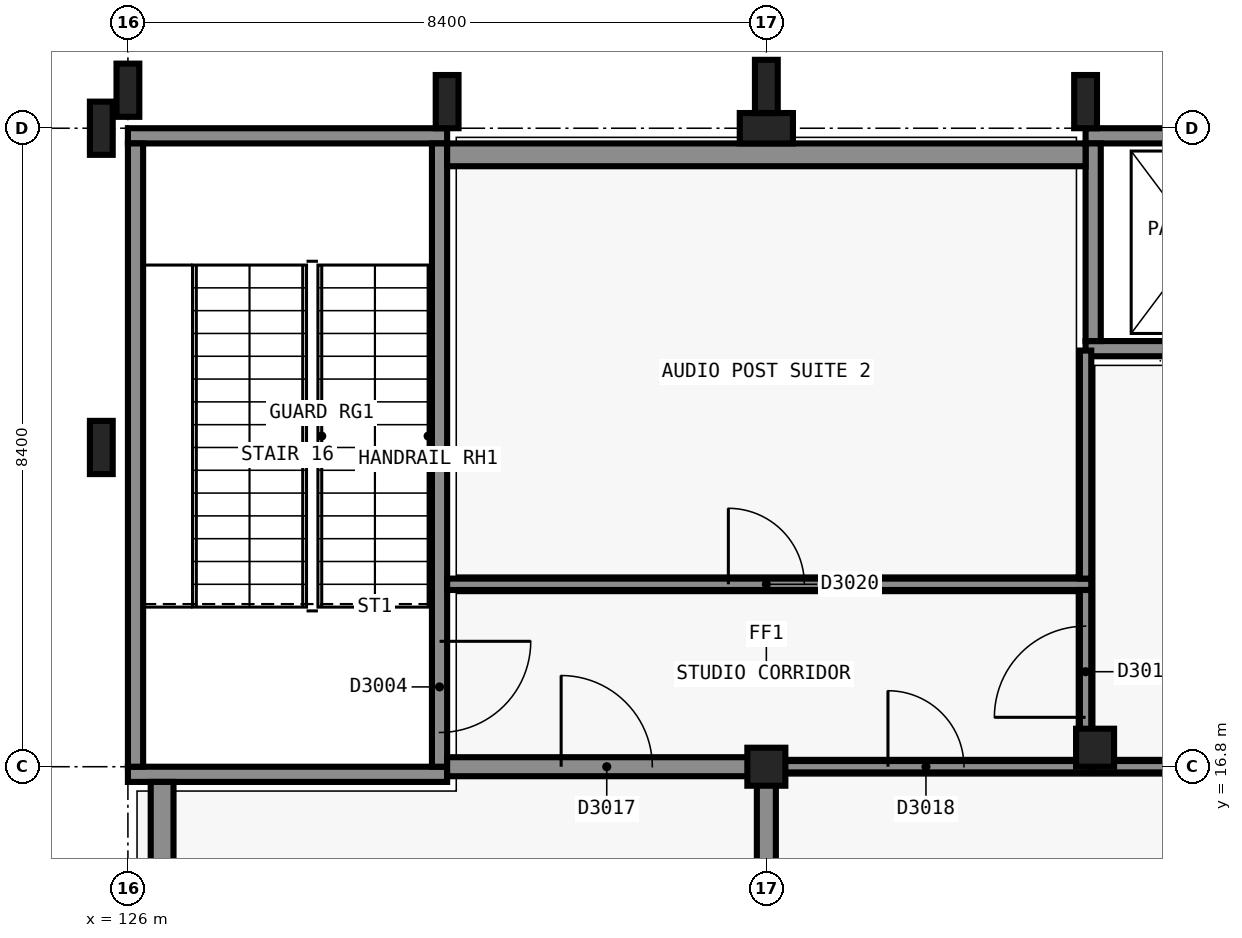
"""IFC4 building model, lengths in metres.
Left out: names, types, materials, properties, quantities, classifications, styles, units other than length and angle.
Written with IfcOpenShell. Run it as: python <this file> out.ifc"""

import sys

from ifc_helpers import new_model, si_unit, direction, frame, frame_2d, origin, origin_2d, place, context, subcontext, project, spatial, rectangle, extrude, element, fill, save


model = new_model("IFC4")
c1 = context("Model", 3, precision=1e-05, world=origin(), true_north=direction((0.0, 1.0)))
c2 = subcontext(c1, "Body", "Model", "MODEL_VIEW")
j1 = project(units=[si_unit("LENGTHUNIT", "METRE"), si_unit("PLANEANGLEUNIT", "RADIAN")], contexts=[c1])
p1 = place(None, origin())
s1 = spatial("IfcSite", under=j1, at=p1, CompositionType="ELEMENT")
p2 = place(p1, origin())
s2 = spatial("IfcBuilding", under=s1, at=p2, CompositionType="ELEMENT")
p3 = place(p2, frame((0.0, 0.0, 15.0)))
s3 = spatial("IfcBuildingStorey", under=s2, at=p3, CompositionType="ELEMENT", Elevation=15.0)
for number, where, z_axis, x_axis in (
    (1, (130.2, 16.7, 0.0), (0.0, 0.0, 1.0), (-1.0, 0.0, 0.0)),
    (2, (126.0, 25.1, 0.0), (0.0, 0.0, 1.0), (1.0, 0.0, 0.0)),
):
    element("IfcWall", number, at=place(p3, frame(where, z_axis=z_axis, x_axis=x_axis)), inside=s3, PredefinedType="SHEAR", context=c2, shape_type="SweptSolid", body=[
        extrude(rectangle(XDim=4.2, YDim=0.2, at=frame_2d((2.1, 0.0))), origin(), (0.0, 0.0, 1.0), 4.8),
    ])
p4 = place(p3, frame((126.1, 16.8, 0.0), z_axis=(0.0, 0.0, 1.0), x_axis=(0.0, 1.0, 0.0)))
e3 = element("IfcWall", 3, at=p4, inside=s3, PredefinedType="SHEAR", context=c2, shape_type="SweptSolid", body=[
    extrude(rectangle(XDim=8.2, YDim=0.2, at=frame_2d((4.1, 0.0))), origin(), (0.0, 0.0, 1.0), 4.8),
])
p5 = place(p3, frame((130.1, 25.0, 0.0), z_axis=(0.0, 0.0, 1.0), x_axis=(0.0, -1.0, 0.0)))
e4 = element("IfcWall", 4, at=p5, inside=s3, PredefinedType="SHEAR", context=c2, shape_type="SweptSolid", body=[
    extrude(rectangle(XDim=8.2, YDim=0.2, at=frame_2d((4.1, 0.0))), origin(), (0.0, 0.0, 1.0), 4.8),
])
p6 = place(p5, frame((6.55, 0.0, 0.0)))
e5 = element("IfcOpeningElement", 5, at=p6, cuts=e4, PredefinedType="OPENING", context=c2, shape_type="SweptSolid", body=[
    extrude(rectangle(XDim=1.2, YDim=2.1, at=frame_2d((0.6, 1.05))), frame((0.0, 0.11, 0.0), z_axis=(0.0, -1.0, 0.0), x_axis=(1.0, 0.0, 0.0)), (0.0, 0.0, 1.0), 0.22),
])
p7 = place(p3, frame((141.6, 22.3, 0.0), z_axis=(0.0, 0.0, 1.0), x_axis=(-1.0, 0.0, 0.0)))
e6 = element("IfcWall", 6, at=p7, inside=s3, PredefinedType="SHEAR", context=c2, shape_type="SweptSolid", body=[
    extrude(rectangle(XDim=3.0, YDim=0.2, at=frame_2d((1.5, 0.0))), origin(), (0.0, 0.0, 1.0), 4.8),
])
p8 = place(p7, frame((0.95, 0.0, 0.0)))
e7 = element("IfcOpeningElement", 7, at=p8, cuts=e6, PredefinedType="OPENING", context=c2, shape_type="SweptSolid", body=[
    extrude(rectangle(XDim=1.1, YDim=2.1, at=frame_2d((0.55, 1.05))), frame((0.0, 0.11, 0.0), z_axis=(0.0, -1.0, 0.0), x_axis=(1.0, 0.0, 0.0)), (0.0, 0.0, 1.0), 0.22),
])
p9 = place(p3, frame((138.6, 25.1, 0.0), z_axis=(0.0, 0.0, 1.0), x_axis=(1.0, 0.0, 0.0)))
e8 = element("IfcWall", 8, at=p9, inside=s3, PredefinedType="SHEAR", context=c2, shape_type="SweptSolid", body=[
    extrude(rectangle(XDim=3.0, YDim=0.2, at=frame_2d((1.5, 0.0))), origin(), (0.0, 0.0, 1.0), 4.8),
])
p10 = place(p3, frame((138.7, 22.4, 0.0), z_axis=(0.0, 0.0, 1.0), x_axis=(0.0, 1.0, 0.0)))
e9 = element("IfcWall", 9, at=p10, inside=s3, PredefinedType="SHEAR", context=c2, shape_type="SweptSolid", body=[
    extrude(rectangle(XDim=2.6, YDim=0.2, at=frame_2d((1.3, 0.0))), origin(), (0.0, 0.0, 1.0), 4.8),
])
p11 = place(p3, frame((134.4, 16.8, 0.0), z_axis=(0.0, 0.0, 1.0), x_axis=(1.0, 0.0, 0.0)))
e10 = element("IfcColumn", 10, at=p11, inside=s3, PredefinedType="COLUMN", context=c2, shape_type="SweptSolid", body=[
    extrude(rectangle(XDim=0.5, YDim=0.5, at=origin_2d()), origin(), (0.0, 0.0, 1.0), 4.8),
])
p12 = place(p3, frame((134.4, 25.2, 0.0), z_axis=(0.0, 0.0, 1.0), x_axis=(1.0, 0.0, 0.0)))
e11 = element("IfcColumn", 11, at=p12, inside=s3, PredefinedType="COLUMN", context=c2, shape_type="SweptSolid", body=[
    extrude(rectangle(XDim=0.7, YDim=0.4, at=origin_2d()), origin(), (0.0, 0.0, 1.0), 4.8),
])
p13 = place(p3, frame((138.725, 17.05, 0.0), z_axis=(0.0, 0.0, 1.0), x_axis=(1.0, 0.0, 0.0)))
e12 = element("IfcColumn", 12, at=p13, inside=s3, PredefinedType="COLUMN", context=c2, shape_type="SweptSolid", body=[
    extrude(rectangle(XDim=0.5, YDim=0.5, at=origin_2d()), origin(), (0.0, 0.0, 1.0), 4.8),
])
p14 = place(p3, frame((130.2, 24.85, 0.0), z_axis=(0.0, 0.0, 1.0), x_axis=(1.0, 0.0, 0.0)))
e13 = element("IfcWall", 13, at=p14, inside=s3, PredefinedType="SOLIDWALL", context=c2, shape_type="SweptSolid", body=[
    extrude(rectangle(XDim=8.4, YDim=0.3, at=frame_2d((4.2, 0.0))), origin(), (0.0, 0.0, 1.0), 4.5),
])
for number, where, z_axis, x_axis in (
    (14, (126.0, 25.7, 0.0), (0.0, 0.0, 1.0), (1.0, 0.0, 0.0)),
    (15, (130.2, 25.55, 0.0), (0.0, 0.0, 1.0), (1.0, 0.0, 0.0)),
    (16, (134.4, 25.75, 0.0), (0.0, 0.0, 1.0), (1.0, 0.0, 0.0)),
    (17, (138.6, 25.55, 0.0), (0.0, 0.0, 1.0), (1.0, 0.0, 0.0)),
):
    element("IfcColumn", number, at=place(p3, frame(where, z_axis=z_axis, x_axis=x_axis)), inside=s3, PredefinedType="PILASTER", context=c2, shape_type="SweptSolid", body=[
        extrude(rectangle(XDim=0.3, YDim=0.7, at=origin_2d()), origin(), (0.0, 0.0, 1.0), 4.8),
    ])
p15 = place(p3, frame((126.45, 12.8, 0.0), z_axis=(0.0, 0.0, 1.0), x_axis=(0.0, 1.0, 0.0)))
e18 = element("IfcWall", 18, at=p15, inside=s3, PredefinedType="SOLIDWALL", context=c2, shape_type="SweptSolid", body=[
    extrude(rectangle(XDim=3.8, YDim=0.3, at=frame_2d((1.9, 0.0))), origin(), (0.0, 0.0, 1.0), 4.5),
])
for number, where, z_axis, x_axis in (
    (19, (125.65, 21.0, 0.0), (0.0, 0.0, 1.0), (0.0, 1.0, 0.0)),
    (20, (125.65, 25.2, 0.0), (0.0, 0.0, 1.0), (0.0, 1.0, 0.0)),
):
    element("IfcColumn", number, at=place(p3, frame(where, z_axis=z_axis, x_axis=x_axis)), inside=s3, PredefinedType="PILASTER", context=c2, shape_type="SweptSolid", body=[
        extrude(rectangle(XDim=0.3, YDim=0.7, at=origin_2d()), origin(), (0.0, 0.0, 1.0), 4.8),
    ])
p16 = place(p3, frame((130.2, 16.8, 0.0), z_axis=(0.0, 0.0, 1.0), x_axis=(1.0, 0.0, 0.0)))
e21 = element("IfcWall", 21, at=p16, inside=s3, PredefinedType="PARTITIONING", context=c2, shape_type="SweptSolid", body=[
    extrude(rectangle(XDim=4.325, YDim=0.25, at=frame_2d((2.163, 0.0))), origin(), (0.0, 0.0, 1.0), 3.7),
])
p17 = place(p16, frame((1.5, 0.0, 0.0)))
e22 = element("IfcOpeningElement", 22, at=p17, cuts=e21, PredefinedType="OPENING", context=c2, shape_type="SweptSolid", body=[
    extrude(rectangle(XDim=1.2, YDim=2.1, at=frame_2d((0.6, 1.05))), frame((0.0, 0.135, 0.0), z_axis=(0.0, -1.0, 0.0), x_axis=(1.0, 0.0, 0.0)), (0.0, 0.0, 1.0), 0.27),
])
p18 = place(p3, frame((134.4, 12.8, 0.0), z_axis=(0.0, 0.0, 1.0), x_axis=(0.0, 1.0, 0.0)))
e23 = element("IfcWall", 23, at=p18, inside=s3, PredefinedType="PARTITIONING", context=c2, shape_type="SweptSolid", body=[
    extrude(rectangle(XDim=3.875, YDim=0.25, at=frame_2d((1.938, 0.0))), origin(), (0.0, 0.0, 1.0), 3.7),
])
p19 = place(p3, frame((134.525, 16.8, 0.0), z_axis=(0.0, 0.0, 1.0), x_axis=(1.0, 0.0, 0.0)))
e24 = element("IfcWall", 24, at=p19, inside=s3, PredefinedType="PARTITIONING", context=c2, shape_type="SweptSolid", body=[
    extrude(rectangle(XDim=4.15, YDim=0.15, at=frame_2d((2.075, 0.0))), origin(), (0.0, 0.0, 1.0), 3.7),
])
p20 = place(p19, frame((1.475, 0.0, 0.0)))
e25 = element("IfcOpeningElement", 25, at=p20, cuts=e24, PredefinedType="OPENING", context=c2, shape_type="SweptSolid", body=[
    extrude(rectangle(XDim=1.0, YDim=2.1, at=frame_2d((0.5, 1.05))), frame((0.0, 0.085, 0.0), z_axis=(0.0, -1.0, 0.0), x_axis=(1.0, 0.0, 0.0)), (0.0, 0.0, 1.0), 0.17),
])
p21 = place(p3, frame((130.2, 19.2, 0.0), z_axis=(0.0, 0.0, 1.0), x_axis=(1.0, 0.0, 0.0)))
e26 = element("IfcWall", 26, at=p21, inside=s3, PredefinedType="PARTITIONING", context=c2, shape_type="SweptSolid", body=[
    extrude(rectangle(XDim=8.475, YDim=0.15, at=frame_2d((4.237, 0.0))), origin(), (0.0, 0.0, 1.0), 3.7),
])
p22 = place(p21, frame((3.7, 0.0, 0.0)))
e27 = element("IfcOpeningElement", 27, at=p22, cuts=e26, PredefinedType="OPENING", context=c2, shape_type="SweptSolid", body=[
    extrude(rectangle(XDim=1.0, YDim=2.1, at=frame_2d((0.5, 1.05))), frame((0.0, 0.085, 0.0), z_axis=(0.0, -1.0, 0.0), x_axis=(1.0, 0.0, 0.0)), (0.0, 0.0, 1.0), 0.17),
])
p23 = place(p3, frame((138.675, 16.8, 0.0), z_axis=(0.0, 0.0, 1.0), x_axis=(1.0, 0.0, 0.0)))
e28 = element("IfcWall", 28, at=p23, inside=s3, PredefinedType="SOLIDWALL", context=c2, shape_type="SweptSolid", body=[
    extrude(rectangle(XDim=7.05, YDim=0.15, at=frame_2d((3.525, 0.0))), origin(), (0.0, 0.0, 1.0), 3.7),
])
p24 = place(p3, frame((138.6, 16.875, 0.0), z_axis=(0.0, 0.0, 1.0), x_axis=(0.0, 1.0, 0.0)))
e29 = element("IfcWall", 29, at=p24, inside=s3, PredefinedType="SOLIDWALL", context=c2, shape_type="SweptSolid", body=[
    extrude(rectangle(XDim=2.25, YDim=0.15, at=frame_2d((1.125, 0.0))), origin(), (0.0, 0.0, 1.0), 3.7),
])
p25 = place(p24, frame((0.575, 0.0, 0.0)))
e30 = element("IfcOpeningElement", 30, at=p25, cuts=e29, PredefinedType="OPENING", context=c2, shape_type="SweptSolid", body=[
    extrude(rectangle(XDim=1.2, YDim=2.1, at=frame_2d((0.6, 1.05))), frame((0.0, 0.085, 0.0), z_axis=(0.0, -1.0, 0.0), x_axis=(1.0, 0.0, 0.0)), (0.0, 0.0, 1.0), 0.17),
])
p26 = place(p3, frame((138.6, 19.275, 0.0), z_axis=(0.0, 0.0, 1.0), x_axis=(0.0, 1.0, 0.0)))
e31 = element("IfcWall", 31, at=p26, inside=s3, PredefinedType="SOLIDWALL", context=c2, shape_type="SweptSolid", body=[
    extrude(rectangle(XDim=3.0, YDim=0.15, at=frame_2d((1.5, 0.0))), origin(), (0.0, 0.0, 1.0), 3.9),
])
p27 = place(p8, origin())
e32 = element("IfcDoor", 32, at=p27, inside=s3, OperationType="SLIDING_TO_LEFT", PredefinedType="DOOR", context=c2, shape_type="SweptSolid", body=[
    extrude(rectangle(XDim=1.1, YDim=2.1, at=frame_2d((0.55, 1.05))), frame((0.0, 0.025, 0.0), z_axis=(0.0, -1.0, 0.0), x_axis=(1.0, 0.0, 0.0)), (0.0, 0.0, 1.0), 0.05),
])
fill(e7, e32)
p28 = place(p6, origin())
e33 = element("IfcDoor", 33, at=p28, inside=s3, OperationType="SINGLE_SWING_LEFT", PredefinedType="DOOR", context=c2, shape_type="SweptSolid", body=[
    extrude(rectangle(XDim=1.2, YDim=2.1, at=frame_2d((0.6, 1.05))), frame((0.0, 0.025, 0.0), z_axis=(0.0, -1.0, 0.0), x_axis=(1.0, 0.0, 0.0)), (0.0, 0.0, 1.0), 0.05),
])
fill(e5, e33)
p29 = place(p17, origin())
e34 = element("IfcDoor", 34, at=p29, inside=s3, OperationType="SINGLE_SWING_RIGHT", PredefinedType="DOOR", context=c2, shape_type="SweptSolid", body=[
    extrude(rectangle(XDim=1.2, YDim=2.1, at=frame_2d((0.6, 1.05))), frame((0.0, 0.025, 0.0), z_axis=(0.0, -1.0, 0.0), x_axis=(1.0, 0.0, 0.0)), (0.0, 0.0, 1.0), 0.05),
])
fill(e22, e34)
p30 = place(p20, origin())
e35 = element("IfcDoor", 35, at=p30, inside=s3, OperationType="SINGLE_SWING_RIGHT", PredefinedType="DOOR", context=c2, shape_type="SweptSolid", body=[
    extrude(rectangle(XDim=1.0, YDim=2.1, at=frame_2d((0.5, 1.05))), frame((0.0, 0.025, 0.0), z_axis=(0.0, -1.0, 0.0), x_axis=(1.0, 0.0, 0.0)), (0.0, 0.0, 1.0), 0.05),
])
fill(e25, e35)
p31 = place(p25, origin())
e36 = element("IfcDoor", 36, at=p31, inside=s3, OperationType="SINGLE_SWING_RIGHT", PredefinedType="DOOR", context=c2, shape_type="SweptSolid", body=[
    extrude(rectangle(XDim=1.2, YDim=2.1, at=frame_2d((0.6, 1.05))), frame((0.0, 0.025, 0.0), z_axis=(0.0, -1.0, 0.0), x_axis=(1.0, 0.0, 0.0)), (0.0, 0.0, 1.0), 0.05),
])
fill(e30, e36)
p32 = place(p22, origin())
e37 = element("IfcDoor", 37, at=p32, inside=s3, OperationType="SINGLE_SWING_LEFT", PredefinedType="DOOR", context=c2, shape_type="SweptSolid", body=[
    extrude(rectangle(XDim=1.0, YDim=2.1, at=frame_2d((0.5, 1.05))), frame((0.0, 0.025, 0.0), z_axis=(0.0, -1.0, 0.0), x_axis=(1.0, 0.0, 0.0)), (0.0, 0.0, 1.0), 0.05),
])
fill(e27, e37)
save(model, sys.argv[1])
